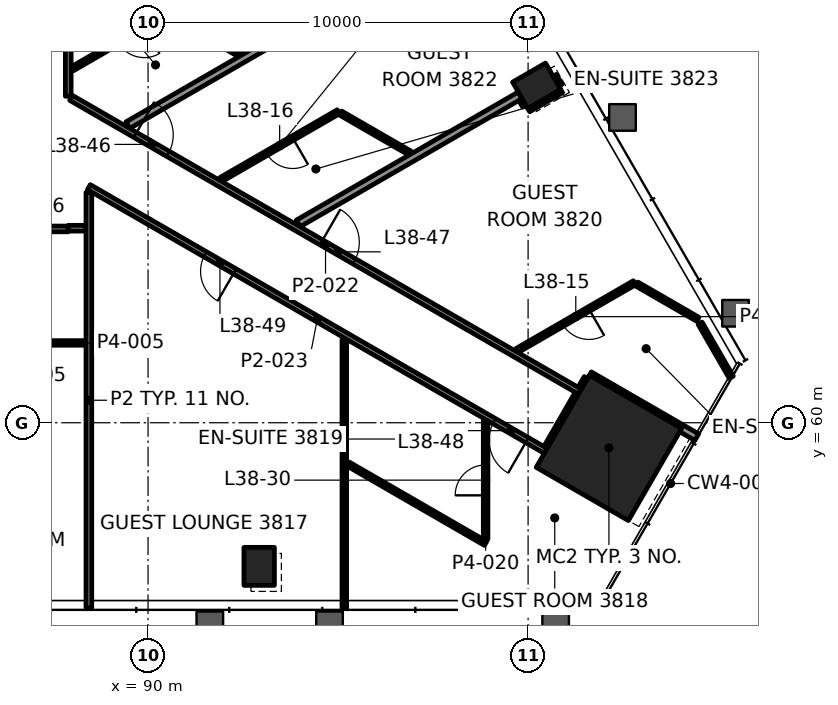
"""IFC4 building model, lengths in metres.
Left out: names, types, materials, properties, quantities, classifications, styles, units other than length and angle.
Written with IfcOpenShell. Run it as: python <this file> out.ifc"""

import sys

from ifc_helpers import new_model, si_unit, direction, frame, frame_2d, origin, origin_2d, place, context, subcontext, project, spatial, rectangle, hollow_rectangle, extrude, element, fill, save


model = new_model("IFC4")
c1 = context("Model", 3, precision=1e-05, world=origin(), true_north=direction((0.0, 1.0)))
c2 = subcontext(c1, "Body", "Model", "MODEL_VIEW")
j1 = project(units=[si_unit("LENGTHUNIT", "METRE"), si_unit("PLANEANGLEUNIT", "RADIAN")], contexts=[c1])
p1 = place(None, origin())
s1 = spatial("IfcSite", under=j1, at=p1, CompositionType="ELEMENT")
p2 = place(p1, origin())
s2 = spatial("IfcBuilding", under=s1, at=p2, CompositionType="ELEMENT")
p3 = place(p2, frame((0.0, 0.0, 167.5)))
s3 = spatial("IfcBuildingStorey", under=s2, at=p3, CompositionType="ELEMENT", Elevation=167.5)
p4 = place(p3, frame((102.127, 59.338, 0.0), z_axis=(0.0, 0.0, 1.0), x_axis=(0.5, 0.866025403784, 0.0)))
e1 = element("IfcColumn", 1, at=p4, inside=s3, PredefinedType="COLUMN", context=c2, shape_type="SweptSolid", body=[
    extrude(rectangle(XDim=2.8, YDim=2.8, at=origin_2d()), origin(), (0.0, 0.0, 1.0), 3.9),
])
for number, where, z_axis, x_axis in (
    (2, (92.924, 56.22, -0.0), (0.0, 0.0, 1.0), (1.0, 0.0, 0.0)),
    (3, (100.225, 68.867, -0.0), (0.0, 0.0, 1.0), (-0.5, 0.866, 0.0)),
):
    element("IfcColumn", number, at=place(p3, frame(where, z_axis=z_axis, x_axis=x_axis)), inside=s3, PredefinedType="COLUMN", context=c2, shape_type="SweptSolid", body=[
        extrude(hollow_rectangle(XDim=0.8, YDim=1.0, WallThickness=0.05, at=origin_2d()), origin(), (0.0, 0.0, 1.0), 3.9),
    ])
p5 = place(p3, frame((84.908, 62.1, 0.0), z_axis=(0.0, 0.0, 1.0), x_axis=(1.0, 0.0, 0.0)))
e4 = element("IfcWall", 4, at=p5, inside=s3, PredefinedType="PARTITIONING", context=c2, shape_type="SweptSolid", body=[
    extrude(rectangle(XDim=3.46, YDim=0.12, at=frame_2d((1.73, 0.0))), origin(), (0.0, 0.0, 1.0), 3.1),
])
p6 = place(p5, frame((1.653, 0.0, 0.0)))
e5 = element("IfcOpeningElement", 5, at=p6, cuts=e4, PredefinedType="OPENING", context=c2, shape_type="SweptSolid", body=[
    extrude(rectangle(XDim=0.8, YDim=2.1, at=frame_2d((0.4, 1.05))), frame((0.0, 0.07, 0.0), z_axis=(0.0, -1.0, 0.0), x_axis=(1.0, 0.0, 0.0)), (0.0, 0.0, 1.0), 0.14),
])
p7 = place(p3, frame((87.899, 65.1, 0.0), z_axis=(0.0, 0.0, 1.0), x_axis=(-1.0, 0.0, 0.0)))
e6 = element("IfcWall", 6, at=p7, inside=s3, PredefinedType="PARTITIONING", context=c2, shape_type="SweptSolid", body=[
    extrude(rectangle(XDim=25.799, YDim=0.15, at=frame_2d((12.899, 0.0))), origin(), (0.0, 0.0, 1.0), 3.1),
])
p8 = place(p7, frame((4.782, 0.0, 0.0)))
e7 = element("IfcOpeningElement", 7, at=p8, cuts=e6, PredefinedType="OPENING", context=c2, shape_type="SweptSolid", body=[
    extrude(rectangle(XDim=1.0, YDim=2.1, at=frame_2d((0.5, 1.05))), frame((0.0, 0.085, 0.0), z_axis=(0.0, -1.0, 0.0), x_axis=(1.0, 0.0, 0.0)), (0.0, 0.0, 1.0), 0.17),
])
p9 = place(p7, frame((8.636, 0.0, 0.0)))
e8 = element("IfcOpeningElement", 8, at=p9, cuts=e6, PredefinedType="OPENING", context=c2, shape_type="SweptSolid", body=[
    extrude(rectangle(XDim=1.0, YDim=2.1, at=frame_2d((0.5, 1.05))), frame((0.0, 0.085, 0.0), z_axis=(0.0, -1.0, 0.0), x_axis=(1.0, 0.0, 0.0)), (0.0, 0.0, 1.0), 0.17),
])
p10 = place(p7, frame((13.117, 0.0, 0.0)))
e9 = element("IfcOpeningElement", 9, at=p10, cuts=e6, PredefinedType="OPENING", context=c2, shape_type="SweptSolid", body=[
    extrude(rectangle(XDim=1.0, YDim=2.1, at=frame_2d((0.5, 1.05))), frame((0.0, 0.085, 0.0), z_axis=(0.0, -1.0, 0.0), x_axis=(1.0, 0.0, 0.0)), (0.0, 0.0, 1.0), 0.17),
])
p11 = place(p7, frame((17.598, 0.0, 0.0)))
e10 = element("IfcOpeningElement", 10, at=p11, cuts=e6, PredefinedType="OPENING", context=c2, shape_type="SweptSolid", body=[
    extrude(rectangle(XDim=1.0, YDim=2.1, at=frame_2d((0.5, 1.05))), frame((0.0, 0.085, 0.0), z_axis=(0.0, -1.0, 0.0), x_axis=(1.0, 0.0, 0.0)), (0.0, 0.0, 1.0), 0.17),
])
p12 = place(p7, frame((22.079, 0.0, 0.0)))
e11 = element("IfcOpeningElement", 11, at=p12, cuts=e6, PredefinedType="OPENING", context=c2, shape_type="SweptSolid", body=[
    extrude(rectangle(XDim=1.0, YDim=2.1, at=frame_2d((0.5, 1.05))), frame((0.0, 0.085, 0.0), z_axis=(0.0, -1.0, 0.0), x_axis=(1.0, 0.0, 0.0)), (0.0, 0.0, 1.0), 0.17),
])
p13 = place(p3, frame((87.9, 65.119, 0.0), z_axis=(0.0, 0.0, 1.0), x_axis=(1.0, 0.0, 0.0)))
e12 = element("IfcWall", 12, at=p13, inside=s3, PredefinedType="PARTITIONING", context=c2, shape_type="SweptSolid", body=[
    extrude(rectangle(XDim=0.468, YDim=0.15, at=frame_2d((0.234, 0.0))), origin(), (0.0, 0.0, 1.0), 3.1),
])
p14 = place(p3, frame((102.8, 63.684, 0.0), z_axis=(0.0, 0.0, 1.0), x_axis=(-0.866028357664, -0.499994883695, 0.0)))
e13 = element("IfcWall", 13, at=p14, inside=s3, PredefinedType="PARTITIONING", context=c2, shape_type="SweptSolid", body=[
    extrude(rectangle(XDim=3.568, YDim=0.12, at=frame_2d((1.784, 0.0))), origin(), (0.0, 0.0, 1.0), 3.1),
])
p15 = place(p14, frame((1.384, 0.0, 0.0)))
e14 = element("IfcOpeningElement", 14, at=p15, cuts=e13, PredefinedType="OPENING", context=c2, shape_type="SweptSolid", body=[
    extrude(rectangle(XDim=0.8, YDim=2.1, at=frame_2d((0.4, 1.05))), frame((0.0, 0.07, 0.0), z_axis=(0.0, -1.0, 0.0), x_axis=(1.0, 0.0, 0.0)), (0.0, 0.0, 1.0), 0.14),
])
p16 = place(p3, frame((99.993, 68.271, 0.0), z_axis=(0.0, 0.0, 1.0), x_axis=(0.86597798544, 0.50008212199, 0.0)))
e15 = element("IfcWall", 15, at=p16, inside=s3, PredefinedType="PARTITIONING", context=c2, shape_type="SweptSolid", body=[
    extrude(rectangle(XDim=0.999, YDim=0.2, at=frame_2d((0.5, 0.0))), origin(), (0.0, 0.0, 1.0), 3.1),
])
p17 = place(p3, frame((93.951, 65.245, 0.0), z_axis=(0.0, 0.0, 1.0), x_axis=(0.866027052535, 0.49999714427, 0.0)))
e16 = element("IfcWall", 16, at=p17, inside=s3, PredefinedType="PARTITIONING", context=c2, shape_type="SweptSolid", body=[
    extrude(rectangle(XDim=6.745, YDim=0.2, at=frame_2d((3.372, 0.0))), origin(), (0.0, 0.0, 1.0), 3.1),
])
p18 = place(p3, frame((95.008, 68.183, 0.0), z_axis=(0.0, 0.0, 1.0), x_axis=(-0.866028357664, -0.499994883695, 0.0)))
e17 = element("IfcWall", 17, at=p18, inside=s3, PredefinedType="PARTITIONING", context=c2, shape_type="SweptSolid", body=[
    extrude(rectangle(XDim=3.568, YDim=0.12, at=frame_2d((1.784, 0.0))), origin(), (0.0, 0.0, 1.0), 3.1),
])
p19 = place(p18, frame((1.384, 0.0, 0.0)))
e18 = element("IfcOpeningElement", 18, at=p19, cuts=e17, PredefinedType="OPENING", context=c2, shape_type="SweptSolid", body=[
    extrude(rectangle(XDim=0.8, YDim=2.1, at=frame_2d((0.4, 1.05))), frame((0.0, 0.07, 0.0), z_axis=(0.0, -1.0, 0.0), x_axis=(1.0, 0.0, 0.0)), (0.0, 0.0, 1.0), 0.14),
])
p20 = place(p3, frame((89.47, 67.832, 0.0), z_axis=(0.0, 0.0, 1.0), x_axis=(0.866016372647, 0.500015642063, 0.0)))
e19 = element("IfcWall", 19, at=p20, inside=s3, PredefinedType="PARTITIONING", context=c2, shape_type="SweptSolid", body=[
    extrude(rectangle(XDim=10.932, YDim=0.2, at=frame_2d((5.466, 0.0))), origin(), (0.0, 0.0, 1.0), 3.022),
])
p21 = place(p3, frame((91.1, 71.101, 0.0), z_axis=(0.0, 0.0, 1.0), x_axis=(-0.866045460162, -0.499965259726, 0.0)))
e20 = element("IfcWall", 20, at=p21, inside=s3, PredefinedType="PARTITIONING", context=c2, shape_type="SweptSolid", body=[
    extrude(rectangle(XDim=3.569, YDim=0.12, at=frame_2d((1.784, 0.0))), origin(), (0.0, 0.0, 1.0), 3.1),
])
p22 = place(p21, frame((1.384, 0.0, 0.0)))
e21 = element("IfcOpeningElement", 21, at=p22, cuts=e20, PredefinedType="OPENING", context=c2, shape_type="SweptSolid", body=[
    extrude(rectangle(XDim=0.8, YDim=2.1, at=frame_2d((0.4, 1.05))), frame((0.0, 0.07, 0.0), z_axis=(0.0, -1.0, 0.0), x_axis=(1.0, 0.0, 0.0)), (0.0, 0.0, 1.0), 0.14),
])
p23 = place(p3, frame((100.502, 59.324, 0.0), z_axis=(0.0, 0.0, 1.0), x_axis=(0.499991515992, 0.866030301974, 0.0)))
e22 = element("IfcWall", 22, at=p23, inside=s3, PredefinedType="PARTITIONING", context=c2, shape_type="SweptSolid", body=[
    extrude(rectangle(XDim=1.649, YDim=0.2, at=frame_2d((0.825, 0.0))), origin(), (0.0, 0.0, 1.0), 2.947),
])
p24 = place(p3, frame((98.882, 56.933, 0.0), z_axis=(0.0, 0.0, 1.0), x_axis=(0.0, 1.0, 0.0)))
e23 = element("IfcWall", 23, at=p24, inside=s3, PredefinedType="PARTITIONING", context=c2, shape_type="SweptSolid", body=[
    extrude(rectangle(XDim=3.113, YDim=0.12, at=frame_2d((1.556, 0.0))), origin(), (0.0, 0.0, 1.0), 3.1),
])
p25 = place(p24, frame((1.156, 0.0, 0.0)))
e24 = element("IfcOpeningElement", 24, at=p25, cuts=e23, PredefinedType="OPENING", context=c2, shape_type="SweptSolid", body=[
    extrude(rectangle(XDim=0.8, YDim=2.1, at=frame_2d((0.4, 1.05))), frame((0.0, 0.07, 0.0), z_axis=(0.0, -1.0, 0.0), x_axis=(1.0, 0.0, 0.0)), (0.0, 0.0, 1.0), 0.14),
])
p26 = place(p3, frame((95.164, 55.121, 0.0), z_axis=(0.0, 0.0, 1.0), x_axis=(0.0, 1.0, 0.0)))
e25 = element("IfcWall", 25, at=p26, inside=s3, PredefinedType="PARTITIONING", context=c2, shape_type="SweptSolid", body=[
    extrude(rectangle(XDim=7.072, YDim=0.12, at=frame_2d((3.536, 0.0))), origin(), (0.0, 0.0, 1.0), 3.1),
])
p27 = place(p3, frame((88.443, 55.121, 0.0), z_axis=(0.0, 0.0, 1.0), x_axis=(0.0, 1.0, 0.0)))
e26 = element("IfcWall", 26, at=p27, inside=s3, PredefinedType="PARTITIONING", context=c2, shape_type="SweptSolid", body=[
    extrude(rectangle(XDim=10.942, YDim=0.15, at=frame_2d((5.471, 0.0))), origin(), (0.0, 0.0, 1.0), 2.947),
])
p28 = place(p3, frame((87.9, 84.899, 0.0), z_axis=(0.0, 0.0, 1.0), x_axis=(0.0, -1.0, 0.0)))
e27 = element("IfcWall", 27, at=p28, inside=s3, PredefinedType="PARTITIONING", context=c2, shape_type="SweptSolid", body=[
    extrude(rectangle(XDim=16.308, YDim=0.15, at=frame_2d((8.154, 0.0))), origin(), (0.0, 0.0, 1.0), 3.1),
])
p29 = place(p28, frame((5.527, 0.0, 0.0)))
e28 = element("IfcOpeningElement", 28, at=p29, cuts=e27, PredefinedType="OPENING", context=c2, shape_type="SweptSolid", body=[
    extrude(rectangle(XDim=1.0, YDim=2.1, at=frame_2d((0.5, 1.05))), frame((0.0, 0.085, 0.0), z_axis=(0.0, -1.0, 0.0), x_axis=(1.0, 0.0, 0.0)), (0.0, 0.0, 1.0), 0.17),
])
p30 = place(p28, frame((13.074, 0.0, 0.0)))
e29 = element("IfcOpeningElement", 29, at=p30, cuts=e27, PredefinedType="OPENING", context=c2, shape_type="SweptSolid", body=[
    extrude(rectangle(XDim=1.0, YDim=2.1, at=frame_2d((0.5, 1.05))), frame((0.0, 0.085, 0.0), z_axis=(0.0, -1.0, 0.0), x_axis=(1.0, 0.0, 0.0)), (0.0, 0.0, 1.0), 0.17),
])
p31 = place(p3, frame((105.347, 61.196, 0.0), z_axis=(0.0, 0.0, 1.0), x_axis=(-0.49992834617, 0.86606676919, 0.0)))
e30 = element("IfcWall", 30, at=p31, inside=s3, PredefinedType="PARTITIONING", context=c2, shape_type="SweptSolid", body=[
    extrude(rectangle(XDim=1.642, YDim=0.12, at=frame_2d((0.821, 0.0))), origin(), (0.0, 0.0, 1.0), 3.1),
])
p32 = place(p3, frame((100.808, 68.858, 0.0), z_axis=(0.0, 0.0, 1.0), x_axis=(-0.49965177357, 0.866226359082, 0.0)))
e31 = element("IfcWall", 31, at=p32, inside=s3, PredefinedType="PARTITIONING", context=c2, shape_type="SweptSolid", body=[
    extrude(rectangle(XDim=0.299, YDim=0.2, at=frame_2d((0.149, 0.0))), origin(), (0.0, 0.0, 1.0), 3.1),
])
p33 = place(p3, frame((99.942, 68.358, 0.0), z_axis=(0.0, 0.0, 1.0), x_axis=(-0.500359323436, 0.865817848887, 0.0)))
e32 = element("IfcWall", 32, at=p33, inside=s3, PredefinedType="PARTITIONING", context=c2, shape_type="SweptSolid", body=[
    extrude(rectangle(XDim=0.199, YDim=0.2, at=frame_2d((0.1, 0.0))), origin(), (0.0, 0.0, 1.0), 3.1),
])
p34 = place(p3, frame((104.466, 62.722, 0.0), z_axis=(0.0, 0.0, 1.0), x_axis=(-0.866047486323, 0.49996174997, 0.0)))
e33 = element("IfcWall", 33, at=p34, inside=s3, PredefinedType="PARTITIONING", context=c2, shape_type="SweptSolid", body=[
    extrude(rectangle(XDim=1.855, YDim=0.12, at=frame_2d((0.927, 0.0))), origin(), (0.0, 0.0, 1.0), 3.1),
])
p35 = place(p3, frame((96.889, 67.097, 0.0), z_axis=(0.0, 0.0, 1.0), x_axis=(-0.866034836963, 0.4999836609, 0.0)))
e34 = element("IfcWall", 34, at=p35, inside=s3, PredefinedType="PARTITIONING", context=c2, shape_type="SweptSolid", body=[
    extrude(rectangle(XDim=2.104, YDim=0.12, at=frame_2d((1.052, 0.0))), origin(), (0.0, 0.0, 1.0), 3.1),
])
p36 = place(p3, frame((92.408, 69.684, 0.0), z_axis=(0.0, 0.0, 1.0), x_axis=(-0.865986401109, 0.500067548531, 0.0)))
e35 = element("IfcWall", 35, at=p36, inside=s3, PredefinedType="PARTITIONING", context=c2, shape_type="SweptSolid", body=[
    extrude(rectangle(XDim=1.51, YDim=0.12, at=frame_2d((0.755, 0.0))), origin(), (0.0, 0.0, 1.0), 3.1),
])
p37 = place(p3, frame((104.438, 59.621, 0.0), z_axis=(0.0, 0.0, 1.0), x_axis=(-0.866035906198, 0.499981808845, 0.0)))
e36 = element("IfcWall", 36, at=p37, inside=s3, PredefinedType="PARTITIONING", context=c2, shape_type="SweptSolid", body=[
    extrude(rectangle(XDim=3.259, YDim=0.2, at=frame_2d((1.63, 0.0))), origin(), (0.0, 0.0, 1.0), 3.1),
])
p38 = place(p3, frame((87.975, 68.548, 0.0), z_axis=(0.0, 0.0, 1.0), x_axis=(0.866029648708, -0.499992647504, 0.0)))
e37 = element("IfcWall", 37, at=p38, inside=s3, PredefinedType="PARTITIONING", context=c2, shape_type="SweptSolid", body=[
    extrude(rectangle(XDim=15.461, YDim=0.15, at=frame_2d((7.73, 0.0))), origin(), (0.0, 0.0, 1.0), 3.1),
])
p39 = place(p38, frame((1.948, 0.0, 0.0)))
e38 = element("IfcOpeningElement", 38, at=p39, cuts=e37, PredefinedType="OPENING", context=c2, shape_type="SweptSolid", body=[
    extrude(rectangle(XDim=1.0, YDim=2.1, at=frame_2d((0.5, 1.05))), frame((0.0, 0.085, 0.0), z_axis=(0.0, -1.0, 0.0), x_axis=(1.0, 0.0, 0.0)), (0.0, 0.0, 1.0), 0.17),
])
p40 = place(p38, frame((7.602, 0.0, 0.0)))
e39 = element("IfcOpeningElement", 39, at=p40, cuts=e37, PredefinedType="OPENING", context=c2, shape_type="SweptSolid", body=[
    extrude(rectangle(XDim=1.0, YDim=2.1, at=frame_2d((0.5, 1.05))), frame((0.0, 0.085, 0.0), z_axis=(0.0, -1.0, 0.0), x_axis=(1.0, 0.0, 0.0)), (0.0, 0.0, 1.0), 0.17),
])
p41 = place(p3, frame((100.464, 59.259, 0.0), z_axis=(0.0, 0.0, 1.0), x_axis=(-0.866026545444, 0.499998022582, 0.0)))
e40 = element("IfcWall", 40, at=p41, inside=s3, PredefinedType="PARTITIONING", context=c2, shape_type="SweptSolid", body=[
    extrude(rectangle(XDim=13.881, YDim=0.15, at=frame_2d((6.94, 0.0))), origin(), (0.0, 0.0, 1.0), 2.947),
])
p42 = place(p41, frame((0.566, 0.0, 0.0)))
e41 = element("IfcOpeningElement", 41, at=p42, cuts=e40, PredefinedType="OPENING", context=c2, shape_type="SweptSolid", body=[
    extrude(rectangle(XDim=1.0, YDim=2.1, at=frame_2d((0.5, 1.05))), frame((0.0, 0.085, 0.0), z_axis=(0.0, -1.0, 0.0), x_axis=(1.0, 0.0, 0.0)), (0.0, 0.0, 1.0), 0.17),
])
p43 = place(p41, frame((9.448, 0.0, 0.0)))
e42 = element("IfcOpeningElement", 42, at=p43, cuts=e40, PredefinedType="OPENING", context=c2, shape_type="SweptSolid", body=[
    extrude(rectangle(XDim=0.9, YDim=2.1, at=frame_2d((0.45, 1.05))), frame((0.0, 0.085, 0.0), z_axis=(0.0, -1.0, 0.0), x_axis=(1.0, 0.0, 0.0)), (0.0, 0.0, 1.0), 0.17),
])
p44 = place(p3, frame((98.882, 56.824, 0.0), z_axis=(0.0, 0.0, 1.0), x_axis=(-0.866022320763, 0.500005339912, 0.0)))
e43 = element("IfcWall", 43, at=p44, inside=s3, PredefinedType="PARTITIONING", context=c2, shape_type="SweptSolid", body=[
    extrude(rectangle(XDim=4.184, YDim=0.12, at=frame_2d((2.092, 0.0))), origin(), (0.0, 0.0, 1.0), 3.1),
])
p45 = place(p3, frame((101.402, 60.883, 0.0), z_axis=(0.0, 0.0, 1.0), x_axis=(0.500265064493, 0.865872314633, 0.0)))
e44 = element("IfcWall", 44, at=p45, inside=s3, PredefinedType="PARTITIONING", context=c2, shape_type="SweptSolid", body=[
    extrude(rectangle(XDim=0.324, YDim=0.2, at=frame_2d((0.162, 0.0))), origin(), (0.0, 0.0, 1.0), 3.1),
])
p46 = place(p15, origin())
e45 = element("IfcDoor", 45, at=p46, inside=s3, OperationType="SINGLE_SWING_LEFT", PredefinedType="DOOR", context=c2, shape_type="SweptSolid", body=[
    extrude(rectangle(XDim=0.8, YDim=2.1, at=frame_2d((0.4, 1.05))), frame((0.0, 0.025, 0.0), z_axis=(0.0, -1.0, 0.0), x_axis=(1.0, 0.0, 0.0)), (0.0, 0.0, 1.0), 0.05),
])
fill(e14, e45)
p47 = place(p19, origin())
e46 = element("IfcDoor", 46, at=p47, inside=s3, OperationType="SINGLE_SWING_LEFT", PredefinedType="DOOR", context=c2, shape_type="SweptSolid", body=[
    extrude(rectangle(XDim=0.8, YDim=2.1, at=frame_2d((0.4, 1.05))), frame((0.0, 0.025, 0.0), z_axis=(0.0, -1.0, 0.0), x_axis=(1.0, 0.0, 0.0)), (0.0, 0.0, 1.0), 0.05),
])
fill(e18, e46)
p48 = place(p25, origin())
e47 = element("IfcDoor", 47, at=p48, inside=s3, OperationType="SINGLE_SWING_RIGHT", PredefinedType="DOOR", context=c2, shape_type="SweptSolid", body=[
    extrude(rectangle(XDim=0.8, YDim=2.1, at=frame_2d((0.4, 1.05))), frame((0.0, 0.025, 0.0), z_axis=(0.0, -1.0, 0.0), x_axis=(1.0, 0.0, 0.0)), (0.0, 0.0, 1.0), 0.05),
])
fill(e24, e47)
p49 = place(p39, origin())
e48 = element("IfcDoor", 48, at=p49, inside=s3, OperationType="SINGLE_SWING_RIGHT", PredefinedType="DOOR", context=c2, shape_type="SweptSolid", body=[
    extrude(rectangle(XDim=1.0, YDim=2.1, at=frame_2d((0.5, 1.05))), frame((0.0, 0.025, 0.0), z_axis=(0.0, -1.0, 0.0), x_axis=(1.0, 0.0, 0.0)), (0.0, 0.0, 1.0), 0.05),
])
fill(e38, e48)
p50 = place(p40, origin())
e49 = element("IfcDoor", 49, at=p50, inside=s3, OperationType="SINGLE_SWING_RIGHT", PredefinedType="DOOR", context=c2, shape_type="SweptSolid", body=[
    extrude(rectangle(XDim=1.0, YDim=2.1, at=frame_2d((0.5, 1.05))), frame((0.0, 0.025, 0.0), z_axis=(0.0, -1.0, 0.0), x_axis=(1.0, 0.0, 0.0)), (0.0, 0.0, 1.0), 0.05),
])
fill(e39, e49)
p51 = place(p42, origin())
e50 = element("IfcDoor", 50, at=p51, inside=s3, OperationType="SINGLE_SWING_LEFT", PredefinedType="DOOR", context=c2, shape_type="SweptSolid", body=[
    extrude(rectangle(XDim=1.0, YDim=2.1, at=frame_2d((0.5, 1.05))), frame((0.0, 0.025, 0.0), z_axis=(0.0, -1.0, 0.0), x_axis=(1.0, 0.0, 0.0)), (0.0, 0.0, 1.0), 0.05),
])
fill(e41, e50)
p52 = place(p43, origin())
e51 = element("IfcDoor", 51, at=p52, inside=s3, OperationType="SINGLE_SWING_RIGHT", PredefinedType="DOOR", context=c2, shape_type="SweptSolid", body=[
    extrude(rectangle(XDim=0.9, YDim=2.1, at=frame_2d((0.45, 1.05))), frame((0.0, 0.025, 0.0), z_axis=(0.0, -1.0, 0.0), x_axis=(1.0, 0.0, 0.0)), (0.0, 0.0, 1.0), 0.05),
])
fill(e42, e51)
p53 = place(p3, origin())
p54 = place(p53, frame((87.009, 55.076, 0.15), z_axis=(0.0, 0.0, 1.0), x_axis=(1.0, 0.0, 0.0)))
p55 = place(p54, origin())
e52 = element("IfcWindow", 52, at=p55, inside=s3, PartitioningType="SINGLE_PANEL", PredefinedType="WINDOW", context=c2, shape_type="SweptSolid", body=[
    extrude(rectangle(XDim=2.912, YDim=3.55, at=frame_2d((1.456, 1.775))), frame((0.0, 0.03, 0.0), z_axis=(0.0, -1.0, 0.0), x_axis=(1.0, 0.0, 0.0)), (0.0, 0.0, 1.0), 0.06),
])
p56 = place(p53, frame((104.204, 64.267, 0.15), z_axis=(0.0, 0.0, 1.0), x_axis=(-0.5, 0.866025, 0.0)))
p57 = place(p56, origin())
e53 = element("IfcWindow", 53, at=p57, inside=s3, PartitioningType="SINGLE_PANEL", PredefinedType="WINDOW", context=c2, shape_type="SweptSolid", body=[
    extrude(rectangle(XDim=2.912, YDim=3.55, at=frame_2d((1.456, 1.775))), frame((0.0, 0.03, 0.0), z_axis=(0.0, -1.0, 0.0), x_axis=(1.0, 0.0, 0.0)), (0.0, 0.0, 1.0), 0.06),
])
save(model, sys.argv[1])
